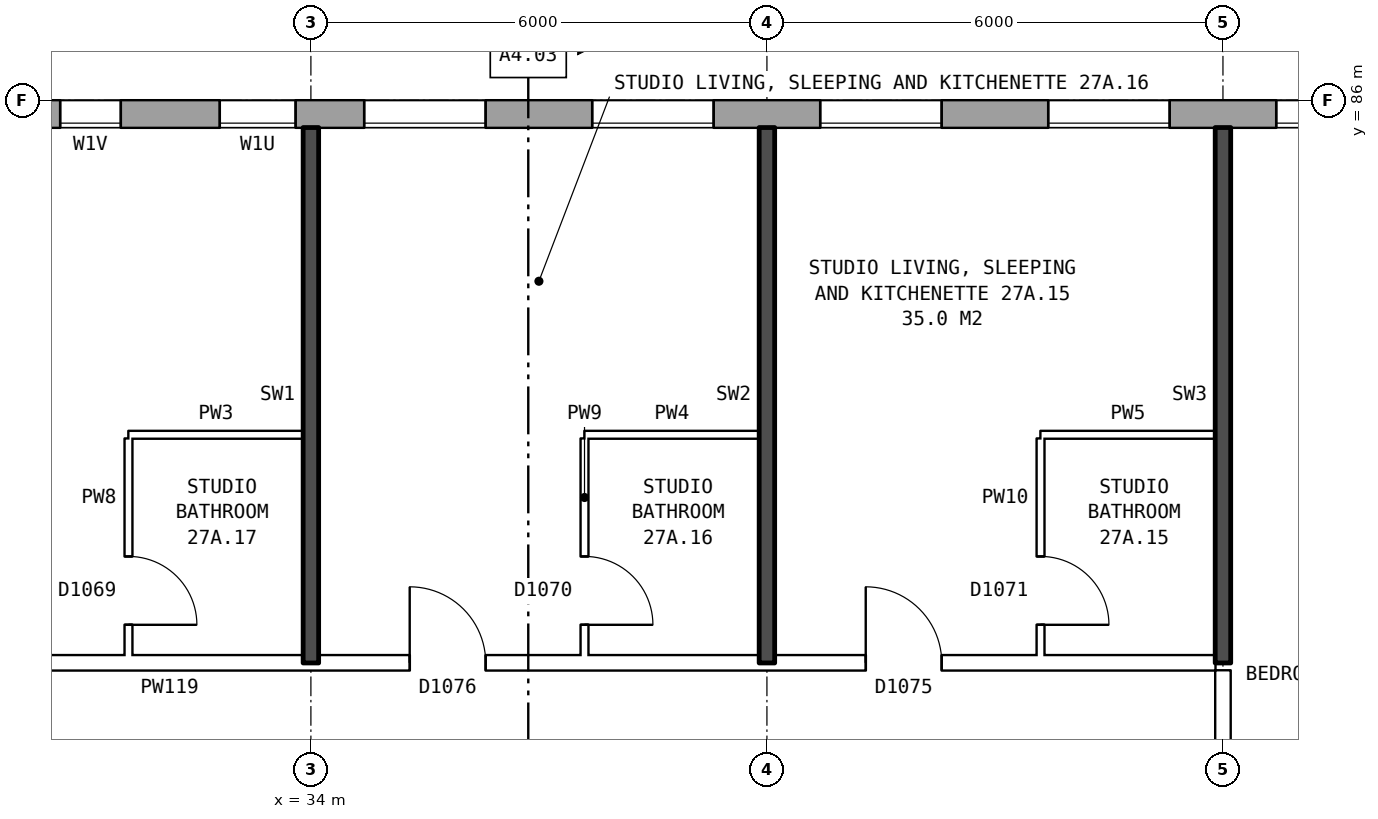
"""IFC4 building model, lengths in metres.
Left out: names, types, materials, properties, quantities, classifications, styles, units other than length and angle.
Written with IfcOpenShell. Run it as: python <this file> out.ifc"""

import sys

from ifc_helpers import new_model, si_unit, direction, frame, frame_2d, origin, place, context, subcontext, project, spatial, rectangle, extrude, element, fill, save


model = new_model("IFC4")
c1 = context("Model", 3, precision=1e-05, world=origin(), true_north=direction((0.0, 1.0)))
c2 = subcontext(c1, "Body", "Model", "MODEL_VIEW")
j1 = project(units=[si_unit("LENGTHUNIT", "METRE"), si_unit("PLANEANGLEUNIT", "RADIAN")], contexts=[c1])
p1 = place(None, origin())
s1 = spatial("IfcSite", under=j1, at=p1, CompositionType="ELEMENT")
p2 = place(p1, origin())
s2 = spatial("IfcBuilding", under=s1, at=p2, CompositionType="ELEMENT")
p3 = place(p2, frame((0.0, 0.0, 99.5)))
s3 = spatial("IfcBuildingStorey", under=s2, at=p3, CompositionType="ELEMENT", Elevation=99.5)
p4 = place(p3, frame((72.925, 85.82, 0.0), z_axis=(0.0, 0.0, 1.0), x_axis=(-1.0, 0.0, 0.0)))
e1 = element("IfcWall", 1, at=p4, inside=s3, PredefinedType="STANDARD", context=c2, shape_type="SweptSolid", body=[
    extrude(rectangle(XDim=44.851, YDim=0.36, at=frame_2d((22.425, 0.0))), origin(), (0.0, 0.0, 1.0), 2.85),
])
p5 = place(p4, frame((0.625, 0.0, 0.8)))
e2 = element("IfcOpeningElement", 2, at=p5, cuts=e1, PredefinedType="OPENING", context=c2, shape_type="SweptSolid", body=[
    extrude(rectangle(XDim=1.6, YDim=1.8, at=frame_2d((0.8, 0.9))), frame((0.0, 0.19, 0.0), z_axis=(0.0, -1.0, 0.0), x_axis=(1.0, 0.0, 0.0)), (0.0, 0.0, 1.0), 0.38),
])
p6 = place(p4, frame((5.075, 0.0, 0.8)))
e3 = element("IfcOpeningElement", 3, at=p6, cuts=e1, PredefinedType="OPENING", context=c2, shape_type="SweptSolid", body=[
    extrude(rectangle(XDim=1.2, YDim=1.2, at=frame_2d((0.6, 0.6))), frame((0.0, 0.19, 0.0), z_axis=(0.0, -1.0, 0.0), x_axis=(1.0, 0.0, 0.0)), (0.0, 0.0, 1.0), 0.38),
])
p7 = place(p4, frame((6.625, 0.0, 0.8)))
e4 = element("IfcOpeningElement", 4, at=p7, cuts=e1, PredefinedType="OPENING", context=c2, shape_type="SweptSolid", body=[
    extrude(rectangle(XDim=1.6, YDim=1.8, at=frame_2d((0.8, 0.9))), frame((0.0, 0.19, 0.0), z_axis=(0.0, -1.0, 0.0), x_axis=(1.0, 0.0, 0.0)), (0.0, 0.0, 1.0), 0.38),
])
p8 = place(p4, frame((9.625, 0.0, 0.8)))
e5 = element("IfcOpeningElement", 5, at=p8, cuts=e1, PredefinedType="OPENING", context=c2, shape_type="SweptSolid", body=[
    extrude(rectangle(XDim=1.6, YDim=1.8, at=frame_2d((0.8, 0.9))), frame((0.0, 0.19, 0.0), z_axis=(0.0, -1.0, 0.0), x_axis=(1.0, 0.0, 0.0)), (0.0, 0.0, 1.0), 0.38),
])
p9 = place(p4, frame((12.625, 0.0, 0.8)))
e6 = element("IfcOpeningElement", 6, at=p9, cuts=e1, PredefinedType="OPENING", context=c2, shape_type="SweptSolid", body=[
    extrude(rectangle(XDim=1.6, YDim=1.8, at=frame_2d((0.8, 0.9))), frame((0.0, 0.19, 0.0), z_axis=(0.0, -1.0, 0.0), x_axis=(1.0, 0.0, 0.0)), (0.0, 0.0, 1.0), 0.38),
])
p10 = place(p4, frame((15.625, 0.0, 0.8)))
e7 = element("IfcOpeningElement", 7, at=p10, cuts=e1, PredefinedType="OPENING", context=c2, shape_type="SweptSolid", body=[
    extrude(rectangle(XDim=1.6, YDim=1.8, at=frame_2d((0.8, 0.9))), frame((0.0, 0.19, 0.0), z_axis=(0.0, -1.0, 0.0), x_axis=(1.0, 0.0, 0.0)), (0.0, 0.0, 1.0), 0.38),
])
p11 = place(p4, frame((18.625, 0.0, 0.8)))
e8 = element("IfcOpeningElement", 8, at=p11, cuts=e1, PredefinedType="OPENING", context=c2, shape_type="SweptSolid", body=[
    extrude(rectangle(XDim=1.6, YDim=1.8, at=frame_2d((0.8, 0.9))), frame((0.0, 0.19, 0.0), z_axis=(0.0, -1.0, 0.0), x_axis=(1.0, 0.0, 0.0)), (0.0, 0.0, 1.0), 0.38),
])
p12 = place(p4, frame((21.625, 0.0, 0.8)))
e9 = element("IfcOpeningElement", 9, at=p12, cuts=e1, PredefinedType="OPENING", context=c2, shape_type="SweptSolid", body=[
    extrude(rectangle(XDim=1.6, YDim=1.8, at=frame_2d((0.8, 0.9))), frame((0.0, 0.19, 0.0), z_axis=(0.0, -1.0, 0.0), x_axis=(1.0, 0.0, 0.0)), (0.0, 0.0, 1.0), 0.38),
])
p13 = place(p4, frame((24.625, 0.0, 0.8)))
e10 = element("IfcOpeningElement", 10, at=p13, cuts=e1, PredefinedType="OPENING", context=c2, shape_type="SweptSolid", body=[
    extrude(rectangle(XDim=1.6, YDim=1.8, at=frame_2d((0.8, 0.9))), frame((0.0, 0.19, 0.0), z_axis=(0.0, -1.0, 0.0), x_axis=(1.0, 0.0, 0.0)), (0.0, 0.0, 1.0), 0.38),
])
p14 = place(p4, frame((27.625, 0.0, 0.8)))
e11 = element("IfcOpeningElement", 11, at=p14, cuts=e1, PredefinedType="OPENING", context=c2, shape_type="SweptSolid", body=[
    extrude(rectangle(XDim=1.6, YDim=1.8, at=frame_2d((0.8, 0.9))), frame((0.0, 0.19, 0.0), z_axis=(0.0, -1.0, 0.0), x_axis=(1.0, 0.0, 0.0)), (0.0, 0.0, 1.0), 0.38),
])
p15 = place(p4, frame((30.625, 0.0, 0.8)))
e12 = element("IfcOpeningElement", 12, at=p15, cuts=e1, PredefinedType="OPENING", context=c2, shape_type="SweptSolid", body=[
    extrude(rectangle(XDim=1.6, YDim=1.8, at=frame_2d((0.8, 0.9))), frame((0.0, 0.19, 0.0), z_axis=(0.0, -1.0, 0.0), x_axis=(1.0, 0.0, 0.0)), (0.0, 0.0, 1.0), 0.38),
])
p16 = place(p4, frame((33.625, 0.0, 0.8)))
e13 = element("IfcOpeningElement", 13, at=p16, cuts=e1, PredefinedType="OPENING", context=c2, shape_type="SweptSolid", body=[
    extrude(rectangle(XDim=1.6, YDim=1.8, at=frame_2d((0.8, 0.9))), frame((0.0, 0.19, 0.0), z_axis=(0.0, -1.0, 0.0), x_axis=(1.0, 0.0, 0.0)), (0.0, 0.0, 1.0), 0.38),
])
p17 = place(p4, frame((36.625, 0.0, 0.8)))
e14 = element("IfcOpeningElement", 14, at=p17, cuts=e1, PredefinedType="OPENING", context=c2, shape_type="SweptSolid", body=[
    extrude(rectangle(XDim=1.6, YDim=1.8, at=frame_2d((0.8, 0.9))), frame((0.0, 0.19, 0.0), z_axis=(0.0, -1.0, 0.0), x_axis=(1.0, 0.0, 0.0)), (0.0, 0.0, 1.0), 0.38),
])
p18 = place(p4, frame((39.125, 0.0, 0.8)))
e15 = element("IfcOpeningElement", 15, at=p18, cuts=e1, PredefinedType="OPENING", context=c2, shape_type="SweptSolid", body=[
    extrude(rectangle(XDim=1.0, YDim=0.9, at=frame_2d((0.5, 0.45))), frame((0.0, 0.19, 0.0), z_axis=(0.0, -1.0, 0.0), x_axis=(1.0, 0.0, 0.0)), (0.0, 0.0, 1.0), 0.38),
])
p19 = place(p4, frame((42.625, 0.0, 0.8)))
e16 = element("IfcOpeningElement", 16, at=p19, cuts=e1, PredefinedType="OPENING", context=c2, shape_type="SweptSolid", body=[
    extrude(rectangle(XDim=1.6, YDim=1.8, at=frame_2d((0.8, 0.9))), frame((0.0, 0.19, 0.0), z_axis=(0.0, -1.0, 0.0), x_axis=(1.0, 0.0, 0.0)), (0.0, 0.0, 1.0), 0.38),
])
p20 = place(p4, frame((41.425, 0.0, 1.7)))
e17 = element("IfcOpeningElement", 17, at=p20, cuts=e1, PredefinedType="OPENING", context=c2, shape_type="SweptSolid", body=[
    extrude(rectangle(XDim=0.8, YDim=0.9, at=frame_2d((0.4, 0.45))), frame((0.0, 0.19, 0.0), z_axis=(0.0, -1.0, 0.0), x_axis=(1.0, 0.0, 0.0)), (0.0, 0.0, 1.0), 0.38),
])
p21 = place(p3, frame((25.36, 78.6, 0.0), z_axis=(0.0, 0.0, 1.0), x_axis=(1.0, 0.0, 0.0)))
e18 = element("IfcWall", 18, at=p21, inside=s3, PredefinedType="PARTITIONING", context=c2, shape_type="SweptSolid", body=[
    extrude(rectangle(XDim=20.54, YDim=0.2, at=frame_2d((10.27, 0.0))), origin(), (0.0, 0.0, 1.0), 2.85),
])
p22 = place(p21, frame((15.94, 0.0, 0.0)))
e19 = element("IfcOpeningElement", 19, at=p22, cuts=e18, PredefinedType="OPENING", context=c2, shape_type="SweptSolid", body=[
    extrude(rectangle(XDim=1.0, YDim=2.1, at=frame_2d((0.5, 1.05))), frame((0.0, 0.11, 0.0), z_axis=(0.0, -1.0, 0.0), x_axis=(1.0, 0.0, 0.0)), (0.0, 0.0, 1.0), 0.22),
])
p23 = place(p21, frame((9.94, 0.0, 0.0)))
e20 = element("IfcOpeningElement", 20, at=p23, cuts=e18, PredefinedType="OPENING", context=c2, shape_type="SweptSolid", body=[
    extrude(rectangle(XDim=1.0, YDim=2.1, at=frame_2d((0.5, 1.05))), frame((0.0, 0.11, 0.0), z_axis=(0.0, -1.0, 0.0), x_axis=(1.0, 0.0, 0.0)), (0.0, 0.0, 1.0), 0.22),
])
p24 = place(p21, frame((2.62, 0.0, 0.0)))
e21 = element("IfcOpeningElement", 21, at=p24, cuts=e18, PredefinedType="OPENING", context=c2, shape_type="SweptSolid", body=[
    extrude(rectangle(XDim=1.0, YDim=2.1, at=frame_2d((0.5, 1.05))), frame((0.0, 0.11, 0.0), z_axis=(0.0, -1.0, 0.0), x_axis=(1.0, 0.0, 0.0)), (0.0, 0.0, 1.0), 0.22),
])
for number, where, z_axis, x_axis in (
    (22, (31.6, 81.6, 0.0), (0.0, 0.0, 1.0), (1.0, 0.0, 0.0)),
    (23, (37.6, 81.6, 0.0), (0.0, 0.0, 1.0), (1.0, 0.0, 0.0)),
    (24, (43.6, 81.6, 0.0), (0.0, 0.0, 1.0), (1.0, 0.0, 0.0)),
):
    element("IfcWall", number, at=place(p3, frame(where, z_axis=z_axis, x_axis=x_axis)), inside=s3, PredefinedType="PARTITIONING", context=c2, shape_type="SweptSolid", body=[
        extrude(rectangle(XDim=2.3, YDim=0.1, at=frame_2d((1.15, 0.0))), origin(), (0.0, 0.0, 1.0), 2.85),
    ])
p25 = place(p3, frame((31.6, 78.7, 0.0), z_axis=(0.0, 0.0, 1.0), x_axis=(0.0, 1.0, 0.0)))
e25 = element("IfcWall", 25, at=p25, inside=s3, PredefinedType="PARTITIONING", context=c2, shape_type="SweptSolid", body=[
    extrude(rectangle(XDim=2.85, YDim=0.1, at=frame_2d((1.425, 0.0))), origin(), (0.0, 0.0, 1.0), 2.85),
])
p26 = place(p25, frame((0.4, 0.0, 0.0)))
e26 = element("IfcOpeningElement", 26, at=p26, cuts=e25, PredefinedType="OPENING", context=c2, shape_type="SweptSolid", body=[
    extrude(rectangle(XDim=0.9, YDim=2.1, at=frame_2d((0.45, 1.05))), frame((0.0, 0.06, 0.0), z_axis=(0.0, -1.0, 0.0), x_axis=(1.0, 0.0, 0.0)), (0.0, 0.0, 1.0), 0.12),
])
p27 = place(p3, frame((34.0, 78.6, 0.0), z_axis=(0.0, 0.0, 1.0), x_axis=(0.0, 1.0, 0.0)))
e27 = element("IfcWall", 27, at=p27, inside=s3, PredefinedType="SOLIDWALL", context=c2, shape_type="SweptSolid", body=[
    extrude(rectangle(XDim=7.04, YDim=0.2, at=frame_2d((3.52, 0.0))), origin(), (0.0, 0.0, 1.0), 2.85),
])
p28 = place(p3, frame((37.6, 78.7, 0.0), z_axis=(0.0, 0.0, 1.0), x_axis=(0.0, 1.0, 0.0)))
e28 = element("IfcWall", 28, at=p28, inside=s3, PredefinedType="PARTITIONING", context=c2, shape_type="SweptSolid", body=[
    extrude(rectangle(XDim=2.85, YDim=0.1, at=frame_2d((1.425, 0.0))), origin(), (0.0, 0.0, 1.0), 2.85),
])
p29 = place(p28, frame((0.4, 0.0, 0.0)))
e29 = element("IfcOpeningElement", 29, at=p29, cuts=e28, PredefinedType="OPENING", context=c2, shape_type="SweptSolid", body=[
    extrude(rectangle(XDim=0.9, YDim=2.1, at=frame_2d((0.45, 1.05))), frame((0.0, 0.06, 0.0), z_axis=(0.0, -1.0, 0.0), x_axis=(1.0, 0.0, 0.0)), (0.0, 0.0, 1.0), 0.12),
])
p30 = place(p3, frame((40.0, 78.6, 0.0), z_axis=(0.0, 0.0, 1.0), x_axis=(0.0, 1.0, 0.0)))
e30 = element("IfcWall", 30, at=p30, inside=s3, PredefinedType="SOLIDWALL", context=c2, shape_type="SweptSolid", body=[
    extrude(rectangle(XDim=7.04, YDim=0.2, at=frame_2d((3.52, 0.0))), origin(), (0.0, 0.0, 1.0), 2.85),
])
p31 = place(p3, frame((43.6, 78.7, 0.0), z_axis=(0.0, 0.0, 1.0), x_axis=(0.0, 1.0, 0.0)))
e31 = element("IfcWall", 31, at=p31, inside=s3, PredefinedType="PARTITIONING", context=c2, shape_type="SweptSolid", body=[
    extrude(rectangle(XDim=2.85, YDim=0.1, at=frame_2d((1.425, 0.0))), origin(), (0.0, 0.0, 1.0), 2.85),
])
p32 = place(p31, frame((0.4, 0.0, 0.0)))
e32 = element("IfcOpeningElement", 32, at=p32, cuts=e31, PredefinedType="OPENING", context=c2, shape_type="SweptSolid", body=[
    extrude(rectangle(XDim=0.9, YDim=2.1, at=frame_2d((0.45, 1.05))), frame((0.0, 0.06, 0.0), z_axis=(0.0, -1.0, 0.0), x_axis=(1.0, 0.0, 0.0)), (0.0, 0.0, 1.0), 0.12),
])
p33 = place(p3, frame((46.0, 76.3, 0.0), z_axis=(0.0, 0.0, 1.0), x_axis=(0.0, 1.0, 0.0)))
e33 = element("IfcWall", 33, at=p33, inside=s3, PredefinedType="PARTITIONING", context=c2, shape_type="SweptSolid", body=[
    extrude(rectangle(XDim=2.2, YDim=0.2, at=frame_2d((1.1, 0.0))), origin(), (0.0, 0.0, 1.0), 2.85),
])
p34 = place(p3, frame((46.0, 78.6, 0.0), z_axis=(0.0, 0.0, 1.0), x_axis=(0.0, 1.0, 0.0)))
e34 = element("IfcWall", 34, at=p34, inside=s3, PredefinedType="SOLIDWALL", context=c2, shape_type="SweptSolid", body=[
    extrude(rectangle(XDim=7.04, YDim=0.2, at=frame_2d((3.52, 0.0))), origin(), (0.0, 0.0, 1.0), 2.85),
])
p35 = place(p13, origin())
e35 = element("IfcWindow", 35, at=p35, inside=s3, PartitioningType="SINGLE_PANEL", PredefinedType="WINDOW", context=c2, shape_type="SweptSolid", body=[
    extrude(rectangle(XDim=1.6, YDim=1.8, at=frame_2d((0.8, 0.9))), frame((0.0, 0.15, 0.0), z_axis=(0.0, -1.0, 0.0), x_axis=(1.0, 0.0, 0.0)), (0.0, 0.0, 1.0), 0.06),
])
fill(e10, e35)
p36 = place(p14, origin())
e36 = element("IfcWindow", 36, at=p36, inside=s3, PartitioningType="SINGLE_PANEL", PredefinedType="WINDOW", context=c2, shape_type="SweptSolid", body=[
    extrude(rectangle(XDim=1.6, YDim=1.8, at=frame_2d((0.8, 0.9))), frame((0.0, 0.15, 0.0), z_axis=(0.0, -1.0, 0.0), x_axis=(1.0, 0.0, 0.0)), (0.0, 0.0, 1.0), 0.06),
])
fill(e11, e36)
p37 = place(p15, origin())
e37 = element("IfcWindow", 37, at=p37, inside=s3, PartitioningType="SINGLE_PANEL", PredefinedType="WINDOW", context=c2, shape_type="SweptSolid", body=[
    extrude(rectangle(XDim=1.6, YDim=1.8, at=frame_2d((0.8, 0.9))), frame((0.0, 0.15, 0.0), z_axis=(0.0, -1.0, 0.0), x_axis=(1.0, 0.0, 0.0)), (0.0, 0.0, 1.0), 0.06),
])
fill(e12, e37)
p38 = place(p16, origin())
e38 = element("IfcWindow", 38, at=p38, inside=s3, PartitioningType="SINGLE_PANEL", PredefinedType="WINDOW", context=c2, shape_type="SweptSolid", body=[
    extrude(rectangle(XDim=1.6, YDim=1.8, at=frame_2d((0.8, 0.9))), frame((0.0, 0.15, 0.0), z_axis=(0.0, -1.0, 0.0), x_axis=(1.0, 0.0, 0.0)), (0.0, 0.0, 1.0), 0.06),
])
fill(e13, e38)
p39 = place(p17, origin())
e39 = element("IfcWindow", 39, at=p39, inside=s3, PartitioningType="SINGLE_PANEL", PredefinedType="WINDOW", context=c2, shape_type="SweptSolid", body=[
    extrude(rectangle(XDim=1.6, YDim=1.8, at=frame_2d((0.8, 0.9))), frame((0.0, 0.15, 0.0), z_axis=(0.0, -1.0, 0.0), x_axis=(1.0, 0.0, 0.0)), (0.0, 0.0, 1.0), 0.06),
])
fill(e14, e39)
p40 = place(p18, origin())
e40 = element("IfcWindow", 40, at=p40, inside=s3, PartitioningType="SINGLE_PANEL", PredefinedType="WINDOW", context=c2, shape_type="SweptSolid", body=[
    extrude(rectangle(XDim=1.0, YDim=0.9, at=frame_2d((0.5, 0.45))), frame((0.0, 0.15, 0.0), z_axis=(0.0, -1.0, 0.0), x_axis=(1.0, 0.0, 0.0)), (0.0, 0.0, 1.0), 0.06),
])
fill(e15, e40)
p41 = place(p22, origin())
e41 = element("IfcDoor", 41, at=p41, inside=s3, OperationType="SINGLE_SWING_LEFT", PredefinedType="DOOR", context=c2, shape_type="SweptSolid", body=[
    extrude(rectangle(XDim=1.0, YDim=2.1, at=frame_2d((0.5, 1.05))), frame((0.0, 0.025, 0.0), z_axis=(0.0, -1.0, 0.0), x_axis=(1.0, 0.0, 0.0)), (0.0, 0.0, 1.0), 0.05),
])
fill(e19, e41)
p42 = place(p32, frame((0.9, 0.0, 0.0), z_axis=(0.0, 0.0, 1.0), x_axis=(-1.0, 0.0, 0.0)))
e42 = element("IfcDoor", 42, at=p42, inside=s3, OperationType="SINGLE_SWING_RIGHT", PredefinedType="DOOR", context=c2, shape_type="SweptSolid", body=[
    extrude(rectangle(XDim=0.9, YDim=2.1, at=frame_2d((0.45, 1.05))), frame((0.0, 0.025, 0.0), z_axis=(0.0, -1.0, 0.0), x_axis=(1.0, 0.0, 0.0)), (0.0, 0.0, 1.0), 0.05),
])
fill(e32, e42)
p43 = place(p23, origin())
e43 = element("IfcDoor", 43, at=p43, inside=s3, OperationType="SINGLE_SWING_LEFT", PredefinedType="DOOR", context=c2, shape_type="SweptSolid", body=[
    extrude(rectangle(XDim=1.0, YDim=2.1, at=frame_2d((0.5, 1.05))), frame((0.0, 0.025, 0.0), z_axis=(0.0, -1.0, 0.0), x_axis=(1.0, 0.0, 0.0)), (0.0, 0.0, 1.0), 0.05),
])
fill(e20, e43)
p44 = place(p29, frame((0.9, 0.0, 0.0), z_axis=(0.0, 0.0, 1.0), x_axis=(-1.0, 0.0, 0.0)))
e44 = element("IfcDoor", 44, at=p44, inside=s3, OperationType="SINGLE_SWING_RIGHT", PredefinedType="DOOR", context=c2, shape_type="SweptSolid", body=[
    extrude(rectangle(XDim=0.9, YDim=2.1, at=frame_2d((0.45, 1.05))), frame((0.0, 0.025, 0.0), z_axis=(0.0, -1.0, 0.0), x_axis=(1.0, 0.0, 0.0)), (0.0, 0.0, 1.0), 0.05),
])
fill(e29, e44)
p45 = place(p26, frame((0.9, 0.0, 0.0), z_axis=(0.0, 0.0, 1.0), x_axis=(-1.0, 0.0, 0.0)))
e45 = element("IfcDoor", 45, at=p45, inside=s3, OperationType="SINGLE_SWING_RIGHT", PredefinedType="DOOR", context=c2, shape_type="SweptSolid", body=[
    extrude(rectangle(XDim=0.9, YDim=2.1, at=frame_2d((0.45, 1.05))), frame((0.0, 0.025, 0.0), z_axis=(0.0, -1.0, 0.0), x_axis=(1.0, 0.0, 0.0)), (0.0, 0.0, 1.0), 0.05),
])
fill(e26, e45)
p46 = place(p20, origin())
e46 = element("IfcWindow", 46, at=p46, inside=s3, PartitioningType="SINGLE_PANEL", PredefinedType="WINDOW", context=c2, shape_type="SweptSolid", body=[
    extrude(rectangle(XDim=0.8, YDim=0.9, at=frame_2d((0.4, 0.45))), frame((0.0, 0.15, 0.0), z_axis=(0.0, -1.0, 0.0), x_axis=(1.0, 0.0, 0.0)), (0.0, 0.0, 1.0), 0.06),
])
fill(e17, e46)
save(model, sys.argv[1])
